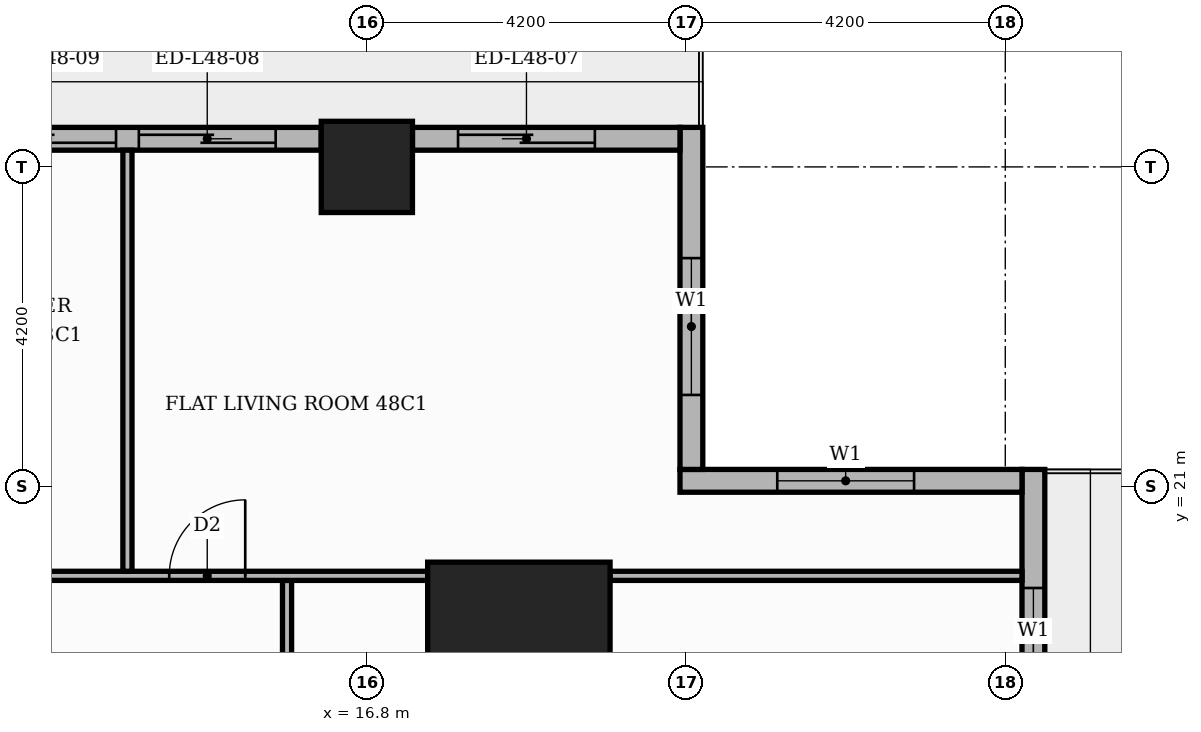
"""IFC4 building model, lengths in metres.
Left out: names, types, materials, properties, quantities, classifications, styles, units other than length and angle.
Written with IfcOpenShell. Run it as: python <this file> out.ifc"""

import sys

from ifc_helpers import new_model, si_unit, direction, frame, frame_2d, origin, origin_2d, place, context, subcontext, project, spatial, rectangle, extrude, element, fill, save


model = new_model("IFC4")
c1 = context("Model", 3, precision=1e-05, world=origin(), true_north=direction((0.0, 1.0)))
c2 = subcontext(c1, "Body", "Model", "MODEL_VIEW")
j1 = project(units=[si_unit("LENGTHUNIT", "METRE"), si_unit("PLANEANGLEUNIT", "RADIAN")], contexts=[c1])
p1 = place(None, origin())
s1 = spatial("IfcSite", under=j1, at=p1, CompositionType="ELEMENT")
p2 = place(p1, origin())
s2 = spatial("IfcBuilding", under=s1, at=p2, CompositionType="ELEMENT")
p3 = place(p2, frame((0.0, 0.0, 204.0)))
s3 = spatial("IfcBuildingStorey", under=s2, at=p3, CompositionType="ELEMENT", Elevation=204.0)
p4 = place(p3, frame((18.8, 18.8, 0.0), z_axis=(0.0, 0.0, 1.0), x_axis=(1.0, 0.0, 0.0)))
e1 = element("IfcColumn", 1, at=p4, inside=s3, PredefinedType="COLUMN", context=c2, shape_type="SweptSolid", body=[
    extrude(rectangle(XDim=2.4, YDim=2.4, at=origin_2d()), origin(), (0.0, 0.0, 1.0), 3.9),
])
p5 = place(p3, frame((16.8, 25.2, 0.0), z_axis=(0.0, 0.0, 1.0), x_axis=(1.0, 0.0, 0.0)))
e2 = element("IfcColumn", 2, at=p5, inside=s3, PredefinedType="COLUMN", context=c2, shape_type="SweptSolid", body=[
    extrude(rectangle(XDim=1.2, YDim=1.2, at=origin_2d()), origin(), (0.0, 0.0, 1.0), 3.9),
])
p6 = place(p3, frame((25.57, 17.4, 0.0), z_axis=(0.0, 0.0, 1.0), x_axis=(0.0, 1.0, 0.0)))
e3 = element("IfcWall", 3, at=p6, inside=s3, PredefinedType="STANDARD", context=c2, shape_type="SweptSolid", body=[
    extrude(rectangle(XDim=3.82, YDim=0.3, at=frame_2d((1.91, 0.0))), origin(), (0.0, 0.0, 1.0), 3.48),
])
p7 = place(p6, frame((0.46, 0.0, 0.9)))
e4 = element("IfcOpeningElement", 4, at=p7, cuts=e3, PredefinedType="OPENING", context=c2, shape_type="SweptSolid", body=[
    extrude(rectangle(XDim=1.8, YDim=2.1, at=frame_2d((0.9, 1.05))), frame((0.0, 0.16, 0.0), z_axis=(0.0, -1.0, 0.0), x_axis=(1.0, 0.0, 0.0)), (0.0, 0.0, 1.0), 0.32),
])
p8 = place(p3, frame((25.42, 21.07, 0.0), z_axis=(0.0, 0.0, 1.0), x_axis=(-1.0, 0.0, 0.0)))
e5 = element("IfcWall", 5, at=p8, inside=s3, PredefinedType="STANDARD", context=c2, shape_type="SweptSolid", body=[
    extrude(rectangle(XDim=4.5, YDim=0.3, at=frame_2d((2.25, 0.0))), origin(), (0.0, 0.0, 1.0), 3.48),
])
p9 = place(p8, frame((1.42, 0.0, 0.9)))
e6 = element("IfcOpeningElement", 6, at=p9, cuts=e5, PredefinedType="OPENING", context=c2, shape_type="SweptSolid", body=[
    extrude(rectangle(XDim=1.8, YDim=2.1, at=frame_2d((0.9, 1.05))), frame((0.0, 0.16, 0.0), z_axis=(0.0, -1.0, 0.0), x_axis=(1.0, 0.0, 0.0)), (0.0, 0.0, 1.0), 0.32),
])
p10 = place(p3, frame((21.07, 21.22, 0.0), z_axis=(0.0, 0.0, 1.0), x_axis=(0.0, 1.0, 0.0)))
e7 = element("IfcWall", 7, at=p10, inside=s3, PredefinedType="STANDARD", context=c2, shape_type="SweptSolid", body=[
    extrude(rectangle(XDim=4.5, YDim=0.3, at=frame_2d((2.25, 0.0))), origin(), (0.0, 0.0, 1.0), 3.48),
])
p11 = place(p10, frame((0.98, 0.0, 0.9)))
e8 = element("IfcOpeningElement", 8, at=p11, cuts=e7, PredefinedType="OPENING", context=c2, shape_type="SweptSolid", body=[
    extrude(rectangle(XDim=1.8, YDim=2.1, at=frame_2d((0.9, 1.05))), frame((0.0, 0.16, 0.0), z_axis=(0.0, -1.0, 0.0), x_axis=(1.0, 0.0, 0.0)), (0.0, 0.0, 1.0), 0.32),
])
p12 = place(p3, frame((20.92, 25.57, 0.0), z_axis=(0.0, 0.0, 1.0), x_axis=(-1.0, 0.0, 0.0)))
e9 = element("IfcWall", 9, at=p12, inside=s3, PredefinedType="STANDARD", context=c2, shape_type="SweptSolid", body=[
    extrude(rectangle(XDim=3.52, YDim=0.3, at=frame_2d((1.76, 0.0))), origin(), (0.0, 0.0, 1.0), 3.48),
])
p13 = place(p12, frame((1.12, 0.0, 0.0)))
e10 = element("IfcOpeningElement", 10, at=p13, cuts=e9, PredefinedType="OPENING", context=c2, shape_type="SweptSolid", body=[
    extrude(rectangle(XDim=1.8, YDim=2.4, at=frame_2d((0.9, 1.2))), frame((0.0, 0.16, 0.0), z_axis=(0.0, -1.0, 0.0), x_axis=(1.0, 0.0, 0.0)), (0.0, 0.0, 1.0), 0.32),
])
p14 = place(p3, frame((16.2, 25.57, 0.0), z_axis=(0.0, 0.0, 1.0), x_axis=(-1.0, 0.0, 0.0)))
e11 = element("IfcWall", 11, at=p14, inside=s3, PredefinedType="STANDARD", context=c2, shape_type="SweptSolid", body=[
    extrude(rectangle(XDim=7.2, YDim=0.3, at=frame_2d((3.6, 0.0))), origin(), (0.0, 0.0, 1.0), 3.48),
])
p15 = place(p14, frame((0.6, 0.0, 0.0)))
e12 = element("IfcOpeningElement", 12, at=p15, cuts=e11, PredefinedType="OPENING", context=c2, shape_type="SweptSolid", body=[
    extrude(rectangle(XDim=1.8, YDim=2.4, at=frame_2d((0.9, 1.2))), frame((0.0, 0.16, 0.0), z_axis=(0.0, -1.0, 0.0), x_axis=(1.0, 0.0, 0.0)), (0.0, 0.0, 1.0), 0.32),
])
p16 = place(p14, frame((2.7, 0.0, 0.0)))
e13 = element("IfcOpeningElement", 13, at=p16, cuts=e11, PredefinedType="OPENING", context=c2, shape_type="SweptSolid", body=[
    extrude(rectangle(XDim=1.8, YDim=2.4, at=frame_2d((0.9, 1.2))), frame((0.0, 0.16, 0.0), z_axis=(0.0, -1.0, 0.0), x_axis=(1.0, 0.0, 0.0)), (0.0, 0.0, 1.0), 0.32),
])
p17 = place(p14, frame((4.8, 0.0, 0.9)))
e14 = element("IfcOpeningElement", 14, at=p17, cuts=e11, PredefinedType="OPENING", context=c2, shape_type="SweptSolid", body=[
    extrude(rectangle(XDim=1.8, YDim=2.1, at=frame_2d((0.9, 1.05))), frame((0.0, 0.16, 0.0), z_axis=(0.0, -1.0, 0.0), x_axis=(1.0, 0.0, 0.0)), (0.0, 0.0, 1.0), 0.32),
])
p18 = place(p3, frame((15.75, 13.75, 0.0), z_axis=(0.0, 0.0, 1.0), x_axis=(0.0, 1.0, 0.0)))
e15 = element("IfcWall", 15, at=p18, inside=s3, PredefinedType="PARTITIONING", context=c2, shape_type="SweptSolid", body=[
    extrude(rectangle(XDim=6.01, YDim=0.12, at=frame_2d((3.005, 0.0))), origin(), (0.0, 0.0, 1.0), 3.48),
])
p19 = place(p18, frame((2.485, 0.0, 0.0)))
e16 = element("IfcOpeningElement", 16, at=p19, cuts=e15, PredefinedType="OPENING", context=c2, shape_type="SweptSolid", body=[
    extrude(rectangle(XDim=1.0, YDim=2.1, at=frame_2d((0.5, 1.05))), frame((0.0, 0.07, 0.0), z_axis=(0.0, -1.0, 0.0), x_axis=(1.0, 0.0, 0.0)), (0.0, 0.0, 1.0), 0.14),
])
p20 = place(p3, frame((5.35, 19.82, 0.0), z_axis=(0.0, 0.0, 1.0), x_axis=(1.0, 0.0, 0.0)))
e17 = element("IfcWall", 17, at=p20, inside=s3, PredefinedType="PARTITIONING", context=c2, shape_type="SweptSolid", body=[
    extrude(rectangle(XDim=12.25, YDim=0.12, at=frame_2d((6.125, 0.0))), origin(), (0.0, 0.0, 1.0), 3.48),
])
p21 = place(p20, frame((8.85, 0.0, 0.0)))
e18 = element("IfcOpeningElement", 18, at=p21, cuts=e17, PredefinedType="OPENING", context=c2, shape_type="SweptSolid", body=[
    extrude(rectangle(XDim=1.0, YDim=2.1, at=frame_2d((0.5, 1.05))), frame((0.0, 0.07, 0.0), z_axis=(0.0, -1.0, 0.0), x_axis=(1.0, 0.0, 0.0)), (0.0, 0.0, 1.0), 0.14),
])
p22 = place(p20, frame((5.75, 0.0, 0.0)))
e19 = element("IfcOpeningElement", 19, at=p22, cuts=e17, PredefinedType="OPENING", context=c2, shape_type="SweptSolid", body=[
    extrude(rectangle(XDim=0.9, YDim=2.1, at=frame_2d((0.45, 1.05))), frame((0.0, 0.07, 0.0), z_axis=(0.0, -1.0, 0.0), x_axis=(1.0, 0.0, 0.0)), (0.0, 0.0, 1.0), 0.14),
])
p23 = place(p3, frame((20.0, 19.82, 0.0), z_axis=(0.0, 0.0, 1.0), x_axis=(1.0, 0.0, 0.0)))
e20 = element("IfcWall", 20, at=p23, inside=s3, PredefinedType="PARTITIONING", context=c2, shape_type="SweptSolid", body=[
    extrude(rectangle(XDim=5.42, YDim=0.12, at=frame_2d((2.71, 0.0))), origin(), (0.0, 0.0, 1.0), 3.48),
])
p24 = place(p3, frame((13.65, 19.88, 0.0), z_axis=(0.0, 0.0, 1.0), x_axis=(0.0, 1.0, 0.0)))
e21 = element("IfcWall", 21, at=p24, inside=s3, PredefinedType="PARTITIONING", context=c2, shape_type="SweptSolid", body=[
    extrude(rectangle(XDim=5.54, YDim=0.12, at=frame_2d((2.77, 0.0))), origin(), (0.0, 0.0, 1.0), 3.48),
])
p25 = place(p7, origin())
e22 = element("IfcWindow", 22, at=p25, inside=s3, PartitioningType="SINGLE_PANEL", PredefinedType="WINDOW", context=c2, shape_type="SweptSolid", body=[
    extrude(rectangle(XDim=1.8, YDim=2.1, at=frame_2d((0.9, 1.05))), frame((0.0, 0.03, 0.0), z_axis=(0.0, -1.0, 0.0), x_axis=(1.0, 0.0, 0.0)), (0.0, 0.0, 1.0), 0.06),
])
fill(e4, e22)
p26 = place(p9, origin())
e23 = element("IfcWindow", 23, at=p26, inside=s3, PartitioningType="SINGLE_PANEL", PredefinedType="WINDOW", context=c2, shape_type="SweptSolid", body=[
    extrude(rectangle(XDim=1.8, YDim=2.1, at=frame_2d((0.9, 1.05))), frame((0.0, 0.03, 0.0), z_axis=(0.0, -1.0, 0.0), x_axis=(1.0, 0.0, 0.0)), (0.0, 0.0, 1.0), 0.06),
])
fill(e6, e23)
p27 = place(p11, origin())
e24 = element("IfcWindow", 24, at=p27, inside=s3, PartitioningType="SINGLE_PANEL", PredefinedType="WINDOW", context=c2, shape_type="SweptSolid", body=[
    extrude(rectangle(XDim=1.8, YDim=2.1, at=frame_2d((0.9, 1.05))), frame((0.0, 0.03, 0.0), z_axis=(0.0, -1.0, 0.0), x_axis=(1.0, 0.0, 0.0)), (0.0, 0.0, 1.0), 0.06),
])
fill(e8, e24)
p28 = place(p13, origin())
e25 = element("IfcDoor", 25, at=p28, inside=s3, OperationType="SLIDING_TO_RIGHT", PredefinedType="DOOR", context=c2, shape_type="SweptSolid", body=[
    extrude(rectangle(XDim=1.8, YDim=2.4, at=frame_2d((0.9, 1.2))), frame((0.0, 0.025, 0.0), z_axis=(0.0, -1.0, 0.0), x_axis=(1.0, 0.0, 0.0)), (0.0, 0.0, 1.0), 0.05),
])
fill(e10, e25)
p29 = place(p15, origin())
e26 = element("IfcDoor", 26, at=p29, inside=s3, OperationType="SLIDING_TO_LEFT", PredefinedType="DOOR", context=c2, shape_type="SweptSolid", body=[
    extrude(rectangle(XDim=1.8, YDim=2.4, at=frame_2d((0.9, 1.2))), frame((0.0, 0.025, 0.0), z_axis=(0.0, -1.0, 0.0), x_axis=(1.0, 0.0, 0.0)), (0.0, 0.0, 1.0), 0.05),
])
fill(e12, e26)
p30 = place(p16, origin())
e27 = element("IfcDoor", 27, at=p30, inside=s3, OperationType="SLIDING_TO_RIGHT", PredefinedType="DOOR", context=c2, shape_type="SweptSolid", body=[
    extrude(rectangle(XDim=1.8, YDim=2.4, at=frame_2d((0.9, 1.2))), frame((0.0, 0.025, 0.0), z_axis=(0.0, -1.0, 0.0), x_axis=(1.0, 0.0, 0.0)), (0.0, 0.0, 1.0), 0.05),
])
fill(e13, e27)
p31 = place(p21, origin())
e28 = element("IfcDoor", 28, at=p31, inside=s3, OperationType="SINGLE_SWING_RIGHT", PredefinedType="DOOR", context=c2, shape_type="SweptSolid", body=[
    extrude(rectangle(XDim=1.0, YDim=2.1, at=frame_2d((0.5, 1.05))), frame((0.0, 0.025, 0.0), z_axis=(0.0, -1.0, 0.0), x_axis=(1.0, 0.0, 0.0)), (0.0, 0.0, 1.0), 0.05),
])
fill(e18, e28)
save(model, sys.argv[1])
